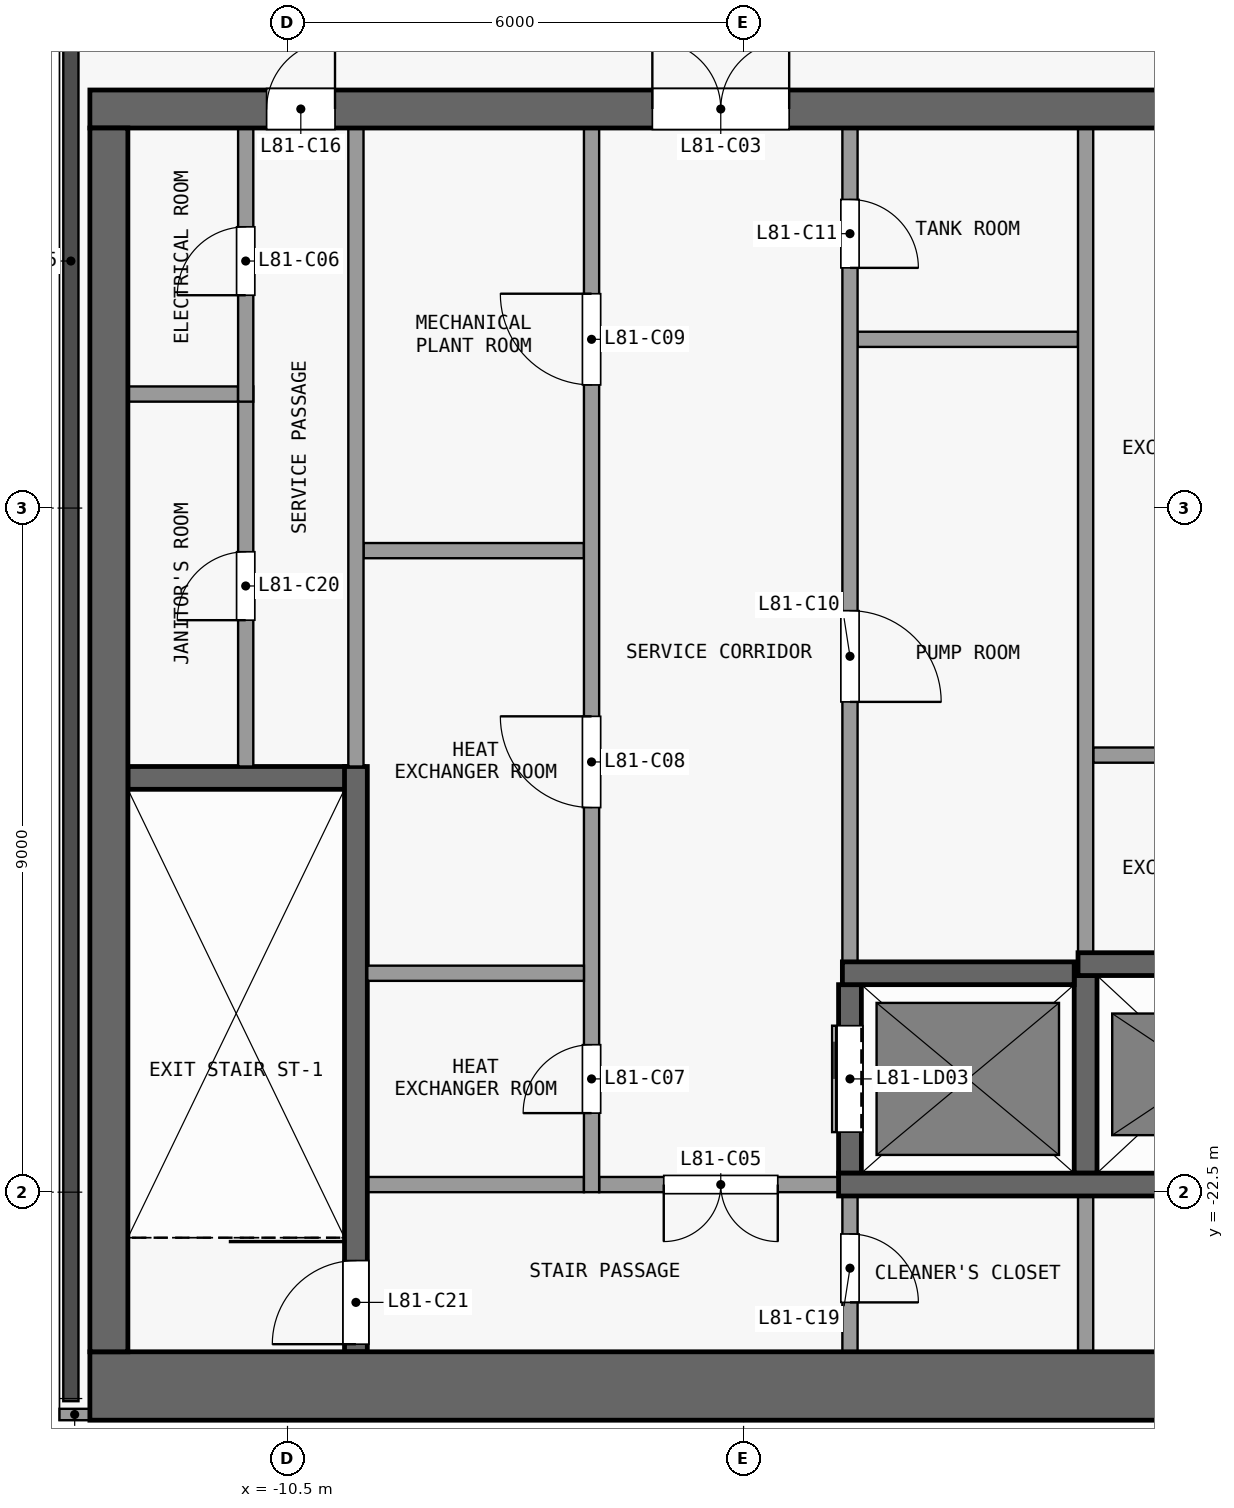
"""IFC4 building model, lengths in metres.
Left out: names, types, materials, properties, quantities, classifications, styles, units other than length and angle.
Written with IfcOpenShell. Run it as: python <this file> out.ifc"""

import sys

from ifc_helpers import new_model, si_unit, direction, frame, frame_2d, origin, place, context, subcontext, project, spatial, rectangle, extrude, element, fill, save


model = new_model("IFC4")
c1 = context("Model", 3, precision=1e-05, world=origin(), true_north=direction((0.0, 1.0)))
c2 = subcontext(c1, "Body", "Model", "MODEL_VIEW")
j1 = project(units=[si_unit("LENGTHUNIT", "METRE"), si_unit("PLANEANGLEUNIT", "RADIAN")], contexts=[c1])
p1 = place(None, origin())
s1 = spatial("IfcSite", under=j1, at=p1, CompositionType="ELEMENT")
p2 = place(p1, origin())
s2 = spatial("IfcBuilding", under=s1, at=p2, CompositionType="ELEMENT")
p3 = place(p2, frame((0.0, 0.0, 321.2)))
s3 = spatial("IfcBuildingStorey", under=s2, at=p3, CompositionType="ELEMENT", Elevation=321.2)
p4 = place(p3, frame((-13.1, -25.05, 0.0), z_axis=(0.0, 0.0, 1.0), x_axis=(1.0, 0.0, 0.0)))
e1 = element("IfcWall", 1, at=p4, inside=s3, PredefinedType="SHEAR", context=c2, shape_type="SweptSolid", body=[
    extrude(rectangle(XDim=26.2, YDim=0.9, at=frame_2d((13.1, 0.0))), origin(), (0.0, 0.0, 1.0), 4.05),
])
p5 = place(p3, frame((-13.1, -8.25, 0.0), z_axis=(0.0, 0.0, 1.0), x_axis=(1.0, 0.0, 0.0)))
e2 = element("IfcWall", 2, at=p5, inside=s3, PredefinedType="SHEAR", context=c2, shape_type="SweptSolid", body=[
    extrude(rectangle(XDim=26.2, YDim=0.5, at=frame_2d((13.1, 0.0))), origin(), (0.0, 0.0, 1.0), 4.05),
])
p6 = place(p5, frame((7.4, 0.0, 0.0)))
e3 = element("IfcOpeningElement", 3, at=p6, cuts=e2, PredefinedType="OPENING", context=c2, shape_type="SweptSolid", body=[
    extrude(rectangle(XDim=1.8, YDim=2.1, at=frame_2d((0.9, 1.05))), frame((0.0, 0.26, 0.0), z_axis=(0.0, -1.0, 0.0), x_axis=(1.0, 0.0, 0.0)), (0.0, 0.0, 1.0), 0.52),
])
p7 = place(p5, frame((17.0, 0.0, 0.0)))
e4 = element("IfcOpeningElement", 4, at=p7, cuts=e2, PredefinedType="OPENING", context=c2, shape_type="SweptSolid", body=[
    extrude(rectangle(XDim=1.8, YDim=2.1, at=frame_2d((0.9, 1.05))), frame((0.0, 0.26, 0.0), z_axis=(0.0, -1.0, 0.0), x_axis=(1.0, 0.0, 0.0)), (0.0, 0.0, 1.0), 0.52),
])
p8 = place(p5, frame((2.325, 0.0, 0.0)))
e5 = element("IfcOpeningElement", 5, at=p8, cuts=e2, PredefinedType="OPENING", context=c2, shape_type="SweptSolid", body=[
    extrude(rectangle(XDim=0.9, YDim=2.1, at=frame_2d((0.45, 1.05))), frame((0.0, 0.26, 0.0), z_axis=(0.0, -1.0, 0.0), x_axis=(1.0, 0.0, 0.0)), (0.0, 0.0, 1.0), 0.52),
])
p9 = place(p5, frame((23.675, 0.0, 0.0)))
e6 = element("IfcOpeningElement", 6, at=p9, cuts=e2, PredefinedType="OPENING", context=c2, shape_type="SweptSolid", body=[
    extrude(rectangle(XDim=1.2, YDim=2.1, at=frame_2d((0.6, 1.05))), frame((0.0, 0.26, 0.0), z_axis=(0.0, -1.0, 0.0), x_axis=(1.0, 0.0, 0.0)), (0.0, 0.0, 1.0), 0.52),
])
p10 = place(p3, frame((-12.85, -24.6, 0.0), z_axis=(0.0, 0.0, 1.0), x_axis=(0.0, 1.0, 0.0)))
e7 = element("IfcWall", 7, at=p10, inside=s3, PredefinedType="SHEAR", context=c2, shape_type="SweptSolid", body=[
    extrude(rectangle(XDim=16.1, YDim=0.5, at=frame_2d((8.05, 0.0))), origin(), (0.0, 0.0, 1.0), 4.05),
])
p11 = place(p3, frame((-9.45, -22.4, 0.0), z_axis=(0.0, 0.0, 1.0), x_axis=(1.0, 0.0, 0.0)))
e8 = element("IfcWall", 8, at=p11, inside=s3, PredefinedType="PARTITIONING", context=c2, shape_type="SweptSolid", body=[
    extrude(rectangle(XDim=2.85, YDim=0.2, at=frame_2d((1.425, 0.0))), origin(), (0.0, 0.0, 1.0), 4.05),
])
p12 = place(p3, frame((-3.25, -22.4, 0.0), z_axis=(0.0, 0.0, 1.0), x_axis=(-1.0, 0.0, 0.0)))
e9 = element("IfcWall", 9, at=p12, inside=s3, PredefinedType="PARTITIONING", context=c2, shape_type="SweptSolid", body=[
    extrude(rectangle(XDim=3.15, YDim=0.2, at=frame_2d((1.575, 0.0))), origin(), (0.0, 0.0, 1.0), 4.05),
])
p13 = place(p12, frame((0.8, 0.0, 0.0)))
e10 = element("IfcOpeningElement", 10, at=p13, cuts=e9, PredefinedType="OPENING", context=c2, shape_type="SweptSolid", body=[
    extrude(rectangle(XDim=1.5, YDim=2.1, at=frame_2d((0.75, 1.05))), frame((0.0, 0.11, 0.0), z_axis=(0.0, -1.0, 0.0), x_axis=(1.0, 0.0, 0.0)), (0.0, 0.0, 1.0), 0.22),
])
p14 = place(p3, frame((-3.25, -22.4, 0.0), z_axis=(0.0, 0.0, 1.0), x_axis=(1.0, 0.0, 0.0)))
e11 = element("IfcWall", 11, at=p14, inside=s3, PredefinedType="SHEAR", context=c2, shape_type="SweptSolid", body=[
    extrude(rectangle(XDim=6.5, YDim=0.3, at=frame_2d((3.25, 0.0))), origin(), (0.0, 0.0, 1.0), 4.05),
])
p15 = place(p3, frame((-9.45, -19.62, 0.0), z_axis=(0.0, 0.0, 1.0), x_axis=(1.0, 0.0, 0.0)))
e12 = element("IfcWall", 12, at=p15, inside=s3, PredefinedType="PARTITIONING", context=c2, shape_type="SweptSolid", body=[
    extrude(rectangle(XDim=2.85, YDim=0.2, at=frame_2d((1.425, 0.0))), origin(), (0.0, 0.0, 1.0), 4.05),
])
p16 = place(p3, frame((-3.2, -19.62, 0.0), z_axis=(0.0, 0.0, 1.0), x_axis=(1.0, 0.0, 0.0)))
e13 = element("IfcWall", 13, at=p16, inside=s3, PredefinedType="SHEAR", context=c2, shape_type="SweptSolid", body=[
    extrude(rectangle(XDim=3.05, YDim=0.3, at=frame_2d((1.525, 0.0))), origin(), (0.0, 0.0, 1.0), 4.05),
])
p17 = place(p3, frame((-0.1, -19.5, 0.0), z_axis=(0.0, 0.0, 1.0), x_axis=(1.0, 0.0, 0.0)))
e14 = element("IfcWall", 14, at=p17, inside=s3, PredefinedType="SHEAR", context=c2, shape_type="SweptSolid", body=[
    extrude(rectangle(XDim=3.3, YDim=0.3, at=frame_2d((1.65, 0.0))), origin(), (0.0, 0.0, 1.0), 4.05),
])
p18 = place(p3, frame((-12.6, -17.05, 0.0), z_axis=(0.0, 0.0, 1.0), x_axis=(1.0, 0.0, 0.0)))
e15 = element("IfcWall", 15, at=p18, inside=s3, PredefinedType="SHEAR", context=c2, shape_type="SweptSolid", body=[
    extrude(rectangle(XDim=3.1, YDim=0.3, at=frame_2d((1.55, 0.0))), origin(), (0.0, 0.0, 1.0), 4.05),
])
for number, where, z_axis, x_axis in (
    (16, (0.1, -16.75, 0.0), (0.0, 0.0, 1.0), (1.0, 0.0, 0.0)),
    (17, (-9.5, -14.06, 0.0), (0.0, 0.0, 1.0), (1.0, 0.0, 0.0)),
):
    element("IfcWall", number, at=place(p3, frame(where, z_axis=z_axis, x_axis=x_axis)), inside=s3, PredefinedType="PARTITIONING", context=c2, shape_type="SweptSolid", body=[
        extrude(rectangle(XDim=2.9, YDim=0.2, at=frame_2d((1.45, 0.0))), origin(), (0.0, 0.0, 1.0), 4.05),
    ])
p19 = place(p3, frame((-12.6, -12.0, 0.0), z_axis=(0.0, 0.0, 1.0), x_axis=(1.0, 0.0, 0.0)))
e18 = element("IfcWall", 18, at=p19, inside=s3, PredefinedType="PARTITIONING", context=c2, shape_type="SweptSolid", body=[
    extrude(rectangle(XDim=1.45, YDim=0.2, at=frame_2d((0.725, 0.0))), origin(), (0.0, 0.0, 1.0), 4.05),
])
p20 = place(p3, frame((-3.0, -11.28, 0.0), z_axis=(0.0, 0.0, 1.0), x_axis=(1.0, 0.0, 0.0)))
e19 = element("IfcWall", 19, at=p20, inside=s3, PredefinedType="PARTITIONING", context=c2, shape_type="SweptSolid", body=[
    extrude(rectangle(XDim=2.9, YDim=0.2, at=frame_2d((1.45, 0.0))), origin(), (0.0, 0.0, 1.0), 4.05),
])
p21 = place(p3, frame((-11.05, -16.9, 0.0), z_axis=(0.0, 0.0, 1.0), x_axis=(0.0, 1.0, 0.0)))
e20 = element("IfcWall", 20, at=p21, inside=s3, PredefinedType="PARTITIONING", context=c2, shape_type="SweptSolid", body=[
    extrude(rectangle(XDim=5.0, YDim=0.2, at=frame_2d((2.5, 0.0))), origin(), (0.0, 0.0, 1.0), 4.05),
])
p22 = place(p21, frame((1.925, 0.0, 0.0)))
e21 = element("IfcOpeningElement", 21, at=p22, cuts=e20, PredefinedType="OPENING", context=c2, shape_type="SweptSolid", body=[
    extrude(rectangle(XDim=0.9, YDim=2.1, at=frame_2d((0.45, 1.05))), frame((0.0, 0.11, 0.0), z_axis=(0.0, -1.0, 0.0), x_axis=(1.0, 0.0, 0.0)), (0.0, 0.0, 1.0), 0.22),
])
p23 = place(p3, frame((-11.05, -12.1, 0.0), z_axis=(0.0, 0.0, 1.0), x_axis=(0.0, 1.0, 0.0)))
e22 = element("IfcWall", 22, at=p23, inside=s3, PredefinedType="PARTITIONING", context=c2, shape_type="SweptSolid", body=[
    extrude(rectangle(XDim=3.6, YDim=0.2, at=frame_2d((1.8, 0.0))), origin(), (0.0, 0.0, 1.0), 4.05),
])
p24 = place(p23, frame((1.4, 0.0, 0.0)))
e23 = element("IfcOpeningElement", 23, at=p24, cuts=e22, PredefinedType="OPENING", context=c2, shape_type="SweptSolid", body=[
    extrude(rectangle(XDim=0.9, YDim=2.1, at=frame_2d((0.45, 1.05))), frame((0.0, 0.11, 0.0), z_axis=(0.0, -1.0, 0.0), x_axis=(1.0, 0.0, 0.0)), (0.0, 0.0, 1.0), 0.22),
])
p25 = place(p3, frame((-9.6, -24.6, 0.0), z_axis=(0.0, 0.0, 1.0), x_axis=(0.0, 1.0, 0.0)))
e24 = element("IfcWall", 24, at=p25, inside=s3, PredefinedType="SHEAR", context=c2, shape_type="SweptSolid", body=[
    extrude(rectangle(XDim=7.7, YDim=0.3, at=frame_2d((3.85, 0.0))), origin(), (0.0, 0.0, 1.0), 4.05),
])
p26 = place(p25, frame((0.1, 0.0, 0.0)))
e25 = element("IfcOpeningElement", 25, at=p26, cuts=e24, PredefinedType="OPENING", context=c2, shape_type="SweptSolid", body=[
    extrude(rectangle(XDim=1.1, YDim=2.1, at=frame_2d((0.55, 1.05))), frame((0.0, 0.16, 0.0), z_axis=(0.0, -1.0, 0.0), x_axis=(1.0, 0.0, 0.0)), (0.0, 0.0, 1.0), 0.32),
])
p27 = place(p3, frame((-9.6, -16.9, 0.0), z_axis=(0.0, 0.0, 1.0), x_axis=(0.0, 1.0, 0.0)))
e26 = element("IfcWall", 26, at=p27, inside=s3, PredefinedType="PARTITIONING", context=c2, shape_type="SweptSolid", body=[
    extrude(rectangle(XDim=8.4, YDim=0.2, at=frame_2d((4.2, 0.0))), origin(), (0.0, 0.0, 1.0), 4.05),
])
p28 = place(p3, frame((-6.5, -22.5, 0.0), z_axis=(0.0, 0.0, 1.0), x_axis=(0.0, 1.0, 0.0)))
e27 = element("IfcWall", 27, at=p28, inside=s3, PredefinedType="PARTITIONING", context=c2, shape_type="SweptSolid", body=[
    extrude(rectangle(XDim=14.0, YDim=0.2, at=frame_2d((7.0, 0.0))), origin(), (0.0, 0.0, 1.0), 4.05),
])
p29 = place(p28, frame((1.04, 0.0, 0.0)))
e28 = element("IfcOpeningElement", 28, at=p29, cuts=e27, PredefinedType="OPENING", context=c2, shape_type="SweptSolid", body=[
    extrude(rectangle(XDim=0.9, YDim=2.1, at=frame_2d((0.45, 1.05))), frame((0.0, 0.11, 0.0), z_axis=(0.0, -1.0, 0.0), x_axis=(1.0, 0.0, 0.0)), (0.0, 0.0, 1.0), 0.22),
])
p30 = place(p28, frame((5.06, 0.0, 0.0)))
e29 = element("IfcOpeningElement", 29, at=p30, cuts=e27, PredefinedType="OPENING", context=c2, shape_type="SweptSolid", body=[
    extrude(rectangle(XDim=1.2, YDim=2.1, at=frame_2d((0.6, 1.05))), frame((0.0, 0.11, 0.0), z_axis=(0.0, -1.0, 0.0), x_axis=(1.0, 0.0, 0.0)), (0.0, 0.0, 1.0), 0.22),
])
p31 = place(p28, frame((10.62, 0.0, 0.0)))
e30 = element("IfcOpeningElement", 30, at=p31, cuts=e27, PredefinedType="OPENING", context=c2, shape_type="SweptSolid", body=[
    extrude(rectangle(XDim=1.2, YDim=2.1, at=frame_2d((0.6, 1.05))), frame((0.0, 0.11, 0.0), z_axis=(0.0, -1.0, 0.0), x_axis=(1.0, 0.0, 0.0)), (0.0, 0.0, 1.0), 0.22),
])
p32 = place(p3, frame((-3.1, -22.55, 0.0), z_axis=(0.0, 0.0, 1.0), x_axis=(0.0, -1.0, 0.0)))
e31 = element("IfcWall", 31, at=p32, inside=s3, PredefinedType="PARTITIONING", context=c2, shape_type="SweptSolid", body=[
    extrude(rectangle(XDim=2.05, YDim=0.2, at=frame_2d((1.025, 0.0))), origin(), (0.0, 0.0, 1.0), 4.05),
])
p33 = place(p32, frame((0.5, 0.0, 0.0)))
e32 = element("IfcOpeningElement", 32, at=p33, cuts=e31, PredefinedType="OPENING", context=c2, shape_type="SweptSolid", body=[
    extrude(rectangle(XDim=0.9, YDim=2.1, at=frame_2d((0.45, 1.05))), frame((0.0, 0.11, 0.0), z_axis=(0.0, -1.0, 0.0), x_axis=(1.0, 0.0, 0.0)), (0.0, 0.0, 1.0), 0.22),
])
p34 = place(p3, frame((-3.1, -22.25, 0.0), z_axis=(0.0, 0.0, 1.0), x_axis=(0.0, 1.0, 0.0)))
e33 = element("IfcWall", 33, at=p34, inside=s3, PredefinedType="SHEAR", context=c2, shape_type="SweptSolid", body=[
    extrude(rectangle(XDim=2.48, YDim=0.3, at=frame_2d((1.24, 0.0))), origin(), (0.0, 0.0, 1.0), 4.05),
])
p35 = place(p34, frame((0.54, 0.0, 0.0)))
e34 = element("IfcOpeningElement", 34, at=p35, cuts=e33, PredefinedType="OPENING", context=c2, shape_type="SweptSolid", body=[
    extrude(rectangle(XDim=1.4, YDim=2.1, at=frame_2d((0.7, 1.05))), frame((0.0, 0.16, 0.0), z_axis=(0.0, -1.0, 0.0), x_axis=(1.0, 0.0, 0.0)), (0.0, 0.0, 1.0), 0.32),
])
p36 = place(p3, frame((-3.1, -8.5, 0.0), z_axis=(0.0, 0.0, 1.0), x_axis=(0.0, -1.0, 0.0)))
e35 = element("IfcWall", 35, at=p36, inside=s3, PredefinedType="PARTITIONING", context=c2, shape_type="SweptSolid", body=[
    extrude(rectangle(XDim=10.97, YDim=0.2, at=frame_2d((5.485, 0.0))), origin(), (0.0, 0.0, 1.0), 4.05),
])
p37 = place(p36, frame((6.35, 0.0, 0.0)))
e36 = element("IfcOpeningElement", 36, at=p37, cuts=e35, PredefinedType="OPENING", context=c2, shape_type="SweptSolid", body=[
    extrude(rectangle(XDim=1.2, YDim=2.1, at=frame_2d((0.6, 1.05))), frame((0.0, 0.11, 0.0), z_axis=(0.0, -1.0, 0.0), x_axis=(1.0, 0.0, 0.0)), (0.0, 0.0, 1.0), 0.22),
])
p38 = place(p36, frame((0.94, 0.0, 0.0)))
e37 = element("IfcOpeningElement", 37, at=p38, cuts=e35, PredefinedType="OPENING", context=c2, shape_type="SweptSolid", body=[
    extrude(rectangle(XDim=0.9, YDim=2.1, at=frame_2d((0.45, 1.05))), frame((0.0, 0.11, 0.0), z_axis=(0.0, -1.0, 0.0), x_axis=(1.0, 0.0, 0.0)), (0.0, 0.0, 1.0), 0.22),
])
p39 = place(p3, frame((0.0, -24.6, 0.0), z_axis=(0.0, 0.0, 1.0), x_axis=(0.0, 1.0, 0.0)))
e38 = element("IfcWall", 38, at=p39, inside=s3, PredefinedType="PARTITIONING", context=c2, shape_type="SweptSolid", body=[
    extrude(rectangle(XDim=2.05, YDim=0.2, at=frame_2d((1.025, 0.0))), origin(), (0.0, 0.0, 1.0), 4.05),
])
p40 = place(p3, frame((0.0, -22.25, 0.0), z_axis=(0.0, 0.0, 1.0), x_axis=(0.0, 1.0, 0.0)))
e39 = element("IfcWall", 39, at=p40, inside=s3, PredefinedType="SHEAR", context=c2, shape_type="SweptSolid", body=[
    extrude(rectangle(XDim=2.6, YDim=0.3, at=frame_2d((1.3, 0.0))), origin(), (0.0, 0.0, 1.0), 4.05),
])
p41 = place(p3, frame((0.0, -19.35, 0.0), z_axis=(0.0, 0.0, 1.0), x_axis=(0.0, 1.0, 0.0)))
e40 = element("IfcWall", 40, at=p41, inside=s3, PredefinedType="PARTITIONING", context=c2, shape_type="SweptSolid", body=[
    extrude(rectangle(XDim=10.85, YDim=0.2, at=frame_2d((5.425, 0.0))), origin(), (0.0, 0.0, 1.0), 4.05),
])
p42 = place(p3, frame((-13.1, -25.425, 0.0), z_axis=(0.0, 0.0, 1.0), x_axis=(-1.0, 0.0, 0.0)))
e41 = element("IfcWall", 41, at=p42, inside=s3, PredefinedType="SOLIDWALL", context=c2, shape_type="SweptSolid", body=[
    extrude(rectangle(XDim=0.4, YDim=0.15, at=frame_2d((0.2, 0.0))), origin(), (0.0, 0.0, 1.0), 4.05),
])
p43 = place(p35, origin())
e42 = element("IfcDoor", 42, at=p43, inside=s3, OperationType="DOUBLE_DOOR_SLIDING", PredefinedType="DOOR", context=c2, shape_type="SweptSolid", body=[
    extrude(rectangle(XDim=1.4, YDim=2.1, at=frame_2d((0.7, 1.05))), frame((0.0, 0.025, 0.0), z_axis=(0.0, -1.0, 0.0), x_axis=(1.0, 0.0, 0.0)), (0.0, 0.0, 1.0), 0.05),
])
fill(e34, e42)
p44 = place(p6, origin())
e43 = element("IfcDoor", 43, at=p44, inside=s3, OperationType="DOUBLE_DOOR_SINGLE_SWING", PredefinedType="DOOR", context=c2, shape_type="SweptSolid", body=[
    extrude(rectangle(XDim=1.8, YDim=2.1, at=frame_2d((0.9, 1.05))), frame((0.0, 0.025, 0.0), z_axis=(0.0, -1.0, 0.0), x_axis=(1.0, 0.0, 0.0)), (0.0, 0.0, 1.0), 0.05),
])
fill(e3, e43)
p45 = place(p13, origin())
e44 = element("IfcDoor", 44, at=p45, inside=s3, OperationType="DOUBLE_DOOR_SINGLE_SWING", PredefinedType="DOOR", context=c2, shape_type="SweptSolid", body=[
    extrude(rectangle(XDim=1.5, YDim=2.1, at=frame_2d((0.75, 1.05))), frame((0.0, 0.025, 0.0), z_axis=(0.0, -1.0, 0.0), x_axis=(1.0, 0.0, 0.0)), (0.0, 0.0, 1.0), 0.05),
])
fill(e10, e44)
p46 = place(p24, origin())
e45 = element("IfcDoor", 45, at=p46, inside=s3, OperationType="SINGLE_SWING_LEFT", PredefinedType="DOOR", context=c2, shape_type="SweptSolid", body=[
    extrude(rectangle(XDim=0.9, YDim=2.1, at=frame_2d((0.45, 1.05))), frame((0.0, 0.025, 0.0), z_axis=(0.0, -1.0, 0.0), x_axis=(1.0, 0.0, 0.0)), (0.0, 0.0, 1.0), 0.05),
])
fill(e23, e45)
p47 = place(p29, origin())
e46 = element("IfcDoor", 46, at=p47, inside=s3, OperationType="SINGLE_SWING_LEFT", PredefinedType="DOOR", context=c2, shape_type="SweptSolid", body=[
    extrude(rectangle(XDim=0.9, YDim=2.1, at=frame_2d((0.45, 1.05))), frame((0.0, 0.025, 0.0), z_axis=(0.0, -1.0, 0.0), x_axis=(1.0, 0.0, 0.0)), (0.0, 0.0, 1.0), 0.05),
])
fill(e28, e46)
p48 = place(p30, origin())
e47 = element("IfcDoor", 47, at=p48, inside=s3, OperationType="SINGLE_SWING_RIGHT", PredefinedType="DOOR", context=c2, shape_type="SweptSolid", body=[
    extrude(rectangle(XDim=1.2, YDim=2.1, at=frame_2d((0.6, 1.05))), frame((0.0, 0.025, 0.0), z_axis=(0.0, -1.0, 0.0), x_axis=(1.0, 0.0, 0.0)), (0.0, 0.0, 1.0), 0.05),
])
fill(e29, e47)
p49 = place(p31, origin())
e48 = element("IfcDoor", 48, at=p49, inside=s3, OperationType="SINGLE_SWING_RIGHT", PredefinedType="DOOR", context=c2, shape_type="SweptSolid", body=[
    extrude(rectangle(XDim=1.2, YDim=2.1, at=frame_2d((0.6, 1.05))), frame((0.0, 0.025, 0.0), z_axis=(0.0, -1.0, 0.0), x_axis=(1.0, 0.0, 0.0)), (0.0, 0.0, 1.0), 0.05),
])
fill(e30, e48)
p50 = place(p37, origin())
e49 = element("IfcDoor", 49, at=p50, inside=s3, OperationType="SINGLE_SWING_RIGHT", PredefinedType="DOOR", context=c2, shape_type="SweptSolid", body=[
    extrude(rectangle(XDim=1.2, YDim=2.1, at=frame_2d((0.6, 1.05))), frame((0.0, 0.025, 0.0), z_axis=(0.0, -1.0, 0.0), x_axis=(1.0, 0.0, 0.0)), (0.0, 0.0, 1.0), 0.05),
])
fill(e36, e49)
p51 = place(p38, origin())
e50 = element("IfcDoor", 50, at=p51, inside=s3, OperationType="SINGLE_SWING_RIGHT", PredefinedType="DOOR", context=c2, shape_type="SweptSolid", body=[
    extrude(rectangle(XDim=0.9, YDim=2.1, at=frame_2d((0.45, 1.05))), frame((0.0, 0.025, 0.0), z_axis=(0.0, -1.0, 0.0), x_axis=(1.0, 0.0, 0.0)), (0.0, 0.0, 1.0), 0.05),
])
fill(e37, e50)
p52 = place(p8, origin())
e51 = element("IfcDoor", 51, at=p52, inside=s3, OperationType="SINGLE_SWING_RIGHT", PredefinedType="DOOR", context=c2, shape_type="SweptSolid", body=[
    extrude(rectangle(XDim=0.9, YDim=2.1, at=frame_2d((0.45, 1.05))), frame((0.0, 0.025, 0.0), z_axis=(0.0, -1.0, 0.0), x_axis=(1.0, 0.0, 0.0)), (0.0, 0.0, 1.0), 0.05),
])
fill(e5, e51)
p53 = place(p33, origin())
e52 = element("IfcDoor", 52, at=p53, inside=s3, OperationType="SINGLE_SWING_RIGHT", PredefinedType="DOOR", context=c2, shape_type="SweptSolid", body=[
    extrude(rectangle(XDim=0.9, YDim=2.1, at=frame_2d((0.45, 1.05))), frame((0.0, 0.025, 0.0), z_axis=(0.0, -1.0, 0.0), x_axis=(1.0, 0.0, 0.0)), (0.0, 0.0, 1.0), 0.05),
])
fill(e32, e52)
p54 = place(p22, origin())
e53 = element("IfcDoor", 53, at=p54, inside=s3, OperationType="SINGLE_SWING_LEFT", PredefinedType="DOOR", context=c2, shape_type="SweptSolid", body=[
    extrude(rectangle(XDim=0.9, YDim=2.1, at=frame_2d((0.45, 1.05))), frame((0.0, 0.025, 0.0), z_axis=(0.0, -1.0, 0.0), x_axis=(1.0, 0.0, 0.0)), (0.0, 0.0, 1.0), 0.05),
])
fill(e21, e53)
p55 = place(p26, origin())
e54 = element("IfcDoor", 54, at=p55, inside=s3, OperationType="SINGLE_SWING_LEFT", PredefinedType="DOOR", context=c2, shape_type="SweptSolid", body=[
    extrude(rectangle(XDim=1.1, YDim=2.1, at=frame_2d((0.55, 1.05))), frame((0.0, 0.025, 0.0), z_axis=(0.0, -1.0, 0.0), x_axis=(1.0, 0.0, 0.0)), (0.0, 0.0, 1.0), 0.05),
])
fill(e25, e54)
save(model, sys.argv[1])
